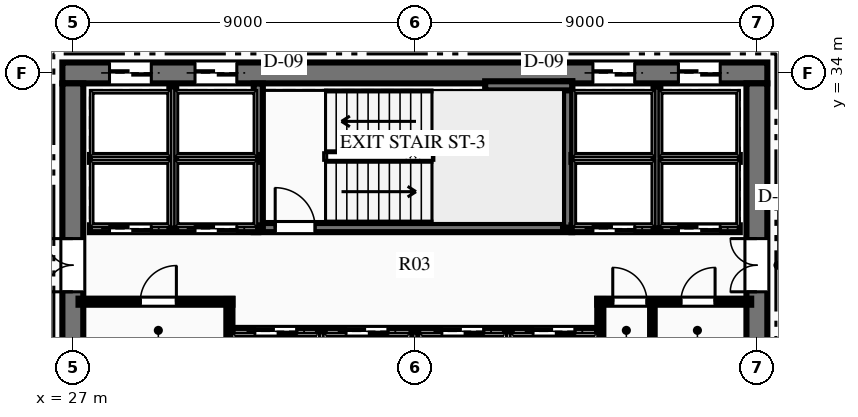
"""IFC4 building model, lengths in metres.
Left out: names, types, materials, properties, quantities, classifications, styles, units other than length and angle.
Written with IfcOpenShell. Run it as: python <this file> out.ifc"""

import sys

from ifc_helpers import new_model, si_unit, direction, frame, frame_2d, origin, place, context, subcontext, project, spatial, rectangle, extrude, element, fill, save


model = new_model("IFC4")
c1 = context("Model", 3, precision=1e-05, world=origin(), true_north=direction((0.0, 1.0)))
c2 = subcontext(c1, "Body", "Model", "MODEL_VIEW")
j1 = project(units=[si_unit("LENGTHUNIT", "METRE"), si_unit("PLANEANGLEUNIT", "RADIAN")], contexts=[c1])
p1 = place(None, origin())
s1 = spatial("IfcSite", under=j1, at=p1, CompositionType="ELEMENT")
p2 = place(p1, origin())
s2 = spatial("IfcBuilding", under=s1, at=p2, CompositionType="ELEMENT")
p3 = place(p2, frame((0.0, 0.0, 105.45)))
s3 = spatial("IfcBuildingStorey", under=s2, at=p3, CompositionType="ELEMENT", Elevation=105.45)
p4 = place(p3, frame((26.725, 34.0, 0.0), z_axis=(0.0, 0.0, 1.0), x_axis=(1.0, 0.0, 0.0)))
e1 = element("IfcWall", 1, at=p4, inside=s3, PredefinedType="SHEAR", context=c2, shape_type="SweptSolid", body=[
    extrude(rectangle(XDim=18.55, YDim=0.55, at=frame_2d((9.275, 0.0))), origin(), (0.0, 0.0, 1.0), 3.75),
])
p5 = place(p4, frame((1.24, 0.0, 0.0)))
e2 = element("IfcOpeningElement", 2, at=p5, cuts=e1, PredefinedType="OPENING", context=c2, shape_type="SweptSolid", body=[
    extrude(rectangle(XDim=1.1, YDim=2.15, at=frame_2d((0.55, 1.075))), frame((0.0, 0.285, 0.0), z_axis=(0.0, -1.0, 0.0), x_axis=(1.0, 0.0, 0.0)), (0.0, 0.0, 1.0), 0.57),
])
p6 = place(p4, frame((3.49, 0.0, 0.0)))
e3 = element("IfcOpeningElement", 3, at=p6, cuts=e1, PredefinedType="OPENING", context=c2, shape_type="SweptSolid", body=[
    extrude(rectangle(XDim=1.1, YDim=2.15, at=frame_2d((0.55, 1.075))), frame((0.0, 0.285, 0.0), z_axis=(0.0, -1.0, 0.0), x_axis=(1.0, 0.0, 0.0)), (0.0, 0.0, 1.0), 0.57),
])
p7 = place(p4, frame((13.96, 0.0, 0.0)))
e4 = element("IfcOpeningElement", 4, at=p7, cuts=e1, PredefinedType="OPENING", context=c2, shape_type="SweptSolid", body=[
    extrude(rectangle(XDim=1.1, YDim=2.15, at=frame_2d((0.55, 1.075))), frame((0.0, 0.285, 0.0), z_axis=(0.0, -1.0, 0.0), x_axis=(1.0, 0.0, 0.0)), (0.0, 0.0, 1.0), 0.57),
])
p8 = place(p4, frame((16.21, 0.0, 0.0)))
e5 = element("IfcOpeningElement", 5, at=p8, cuts=e1, PredefinedType="OPENING", context=c2, shape_type="SweptSolid", body=[
    extrude(rectangle(XDim=1.1, YDim=2.15, at=frame_2d((0.55, 1.075))), frame((0.0, 0.285, 0.0), z_axis=(0.0, -1.0, 0.0), x_axis=(1.0, 0.0, 0.0)), (0.0, 0.0, 1.0), 0.57),
])
p9 = place(p3, frame((27.0, 18.275, 0.0), z_axis=(0.0, 0.0, 1.0), x_axis=(0.0, 1.0, 0.0)))
e6 = element("IfcWall", 6, at=p9, inside=s3, PredefinedType="SHEAR", context=c2, shape_type="SweptSolid", body=[
    extrude(rectangle(XDim=15.45, YDim=0.55, at=frame_2d((7.725, 0.0))), origin(), (0.0, 0.0, 1.0), 3.75),
])
p10 = place(p9, frame((9.965, 0.0, 0.0)))
e7 = element("IfcOpeningElement", 7, at=p10, cuts=e6, PredefinedType="OPENING", context=c2, shape_type="SweptSolid", body=[
    extrude(rectangle(XDim=1.4, YDim=2.2, at=frame_2d((0.7, 1.1))), frame((0.0, 0.285, 0.0), z_axis=(0.0, -1.0, 0.0), x_axis=(1.0, 0.0, 0.0)), (0.0, 0.0, 1.0), 0.57),
])
p11 = place(p3, frame((45.0, 18.275, 0.0), z_axis=(0.0, 0.0, 1.0), x_axis=(0.0, 1.0, 0.0)))
e8 = element("IfcWall", 8, at=p11, inside=s3, PredefinedType="SHEAR", context=c2, shape_type="SweptSolid", body=[
    extrude(rectangle(XDim=15.45, YDim=0.55, at=frame_2d((7.725, 0.0))), origin(), (0.0, 0.0, 1.0), 3.75),
])
p12 = place(p11, frame((9.965, 0.0, 0.0)))
e9 = element("IfcOpeningElement", 9, at=p12, cuts=e8, PredefinedType="OPENING", context=c2, shape_type="SweptSolid", body=[
    extrude(rectangle(XDim=1.4, YDim=2.2, at=frame_2d((0.7, 1.1))), frame((0.0, 0.285, 0.0), z_axis=(0.0, -1.0, 0.0), x_axis=(1.0, 0.0, 0.0)), (0.0, 0.0, 1.0), 0.57),
])
p13 = place(p3, frame((31.76, 29.93, 0.0), z_axis=(0.0, 0.0, 1.0), x_axis=(1.0, 0.0, 0.0)))
e10 = element("IfcWall", 10, at=p13, inside=s3, PredefinedType="SHEAR", context=c2, shape_type="SweptSolid", body=[
    extrude(rectangle(XDim=8.38, YDim=0.24, at=frame_2d((4.19, 0.0))), origin(), (0.0, 0.0, 1.0), 3.75),
])
p14 = place(p13, frame((0.565, 0.0, 0.0)))
e11 = element("IfcOpeningElement", 11, at=p14, cuts=e10, PredefinedType="OPENING", context=c2, shape_type="SweptSolid", body=[
    extrude(rectangle(XDim=1.05, YDim=2.15, at=frame_2d((0.525, 1.075))), frame((0.0, 0.13, 0.0), z_axis=(0.0, -1.0, 0.0), x_axis=(1.0, 0.0, 0.0)), (0.0, 0.0, 1.0), 0.26),
])
p15 = place(p3, frame((31.88, 29.93, 0.0), z_axis=(0.0, 0.0, 1.0), x_axis=(0.0, 1.0, 0.0)))
e12 = element("IfcWall", 12, at=p15, inside=s3, PredefinedType="SHEAR", context=c2, shape_type="SweptSolid", body=[
    extrude(rectangle(XDim=3.79, YDim=0.24, at=frame_2d((1.895, 0.0))), origin(), (0.0, 0.0, 1.0), 3.75),
])
p16 = place(p3, frame((40.02, 29.93, 0.0), z_axis=(0.0, 0.0, 1.0), x_axis=(0.0, 1.0, 0.0)))
e13 = element("IfcWall", 13, at=p16, inside=s3, PredefinedType="SHEAR", context=c2, shape_type="SweptSolid", body=[
    extrude(rectangle(XDim=3.85, YDim=0.24, at=frame_2d((1.925, 0.0))), origin(), (0.0, 0.0, 1.0), 3.75),
])
p17 = place(p3, frame((37.85, 33.66, 0.0), z_axis=(0.0, 0.0, 1.0), x_axis=(1.0, 0.0, 0.0)))
e14 = element("IfcWall", 14, at=p17, inside=s3, PredefinedType="SHEAR", context=c2, shape_type="SweptSolid", body=[
    extrude(rectangle(XDim=2.29, YDim=0.24, at=frame_2d((1.145, 0.0))), origin(), (0.0, 0.0, 1.0), 3.75),
])
p18 = place(p3, frame((27.15, 27.98, 0.0), z_axis=(0.0, 0.0, 1.0), x_axis=(1.0, 0.0, 0.0)))
e15 = element("IfcWall", 15, at=p18, inside=s3, PredefinedType="PARTITIONING", context=c2, shape_type="SweptSolid", body=[
    extrude(rectangle(XDim=4.05, YDim=0.16, at=frame_2d((2.025, 0.0))), origin(), (0.0, 0.0, 1.0), 3.45),
])
p19 = place(p18, frame((1.625, 0.0, 0.0)))
e16 = element("IfcOpeningElement", 16, at=p19, cuts=e15, PredefinedType="OPENING", context=c2, shape_type="SweptSolid", body=[
    extrude(rectangle(XDim=0.95, YDim=2.15, at=frame_2d((0.475, 1.075))), frame((0.0, 0.09, 0.0), z_axis=(0.0, -1.0, 0.0), x_axis=(1.0, 0.0, 0.0)), (0.0, 0.0, 1.0), 0.18),
])
p20 = place(p3, frame((31.12, 26.54, 0.0), z_axis=(0.0, 0.0, 1.0), x_axis=(0.0, 1.0, 0.0)))
e17 = element("IfcWall", 17, at=p20, inside=s3, PredefinedType="PARTITIONING", context=c2, shape_type="SweptSolid", body=[
    extrude(rectangle(XDim=1.51, YDim=0.16, at=frame_2d((0.755, 0.0))), origin(), (0.0, 0.0, 1.0), 3.45),
])
p21 = place(p3, frame((40.8, 27.98, 0.0), z_axis=(0.0, 0.0, 1.0), x_axis=(1.0, 0.0, 0.0)))
e18 = element("IfcWall", 18, at=p21, inside=s3, PredefinedType="PARTITIONING", context=c2, shape_type="SweptSolid", body=[
    extrude(rectangle(XDim=4.05, YDim=0.16, at=frame_2d((2.025, 0.0))), origin(), (0.0, 0.0, 1.0), 3.45),
])
p22 = place(p21, frame((0.407, 0.0, 0.0)))
e19 = element("IfcOpeningElement", 19, at=p22, cuts=e18, PredefinedType="OPENING", context=c2, shape_type="SweptSolid", body=[
    extrude(rectangle(XDim=0.9, YDim=2.15, at=frame_2d((0.45, 1.075))), frame((0.0, 0.09, 0.0), z_axis=(0.0, -1.0, 0.0), x_axis=(1.0, 0.0, 0.0)), (0.0, 0.0, 1.0), 0.18),
])
p23 = place(p21, frame((2.2, 0.0, 0.0)))
e20 = element("IfcOpeningElement", 20, at=p23, cuts=e18, PredefinedType="OPENING", context=c2, shape_type="SweptSolid", body=[
    extrude(rectangle(XDim=0.9, YDim=2.15, at=frame_2d((0.45, 1.075))), frame((0.0, 0.09, 0.0), z_axis=(0.0, -1.0, 0.0), x_axis=(1.0, 0.0, 0.0)), (0.0, 0.0, 1.0), 0.18),
])
p24 = place(p3, frame((40.88, 26.54, 0.0), z_axis=(0.0, 0.0, 1.0), x_axis=(0.0, 1.0, 0.0)))
e21 = element("IfcWall", 21, at=p24, inside=s3, PredefinedType="PARTITIONING", context=c2, shape_type="SweptSolid", body=[
    extrude(rectangle(XDim=1.51, YDim=0.16, at=frame_2d((0.755, 0.0))), origin(), (0.0, 0.0, 1.0), 3.45),
])
p25 = place(p3, frame((42.25, 26.54, 0.0), z_axis=(0.0, 0.0, 1.0), x_axis=(0.0, 1.0, 0.0)))
e22 = element("IfcWall", 22, at=p25, inside=s3, PredefinedType="PARTITIONING", context=c2, shape_type="SweptSolid", body=[
    extrude(rectangle(XDim=1.44, YDim=0.12, at=frame_2d((0.72, 0.0))), origin(), (0.0, 0.0, 1.0), 3.45),
])
p26 = place(p3, frame((27.45, 29.9, 0.0), z_axis=(0.0, 0.0, 1.0), x_axis=(1.0, 0.0, 0.0)))
e23 = element("IfcWall", 23, at=p26, inside=s3, PredefinedType="PARTITIONING", context=c2, shape_type="SweptSolid", body=[
    extrude(rectangle(XDim=4.43, YDim=0.18, at=frame_2d((2.215, 0.0))), origin(), (0.0, 0.0, 1.0), 3.45),
])
p27 = place(p26, frame((0.515, 0.0, 0.0)))
e24 = element("IfcOpeningElement", 24, at=p27, cuts=e23, PredefinedType="OPENING", context=c2, shape_type="SweptSolid", body=[
    extrude(rectangle(XDim=1.1, YDim=2.15, at=frame_2d((0.55, 1.075))), frame((0.0, 0.1, 0.0), z_axis=(0.0, -1.0, 0.0), x_axis=(1.0, 0.0, 0.0)), (0.0, 0.0, 1.0), 0.2),
])
p28 = place(p26, frame((2.765, 0.0, 0.0)))
e25 = element("IfcOpeningElement", 25, at=p28, cuts=e23, PredefinedType="OPENING", context=c2, shape_type="SweptSolid", body=[
    extrude(rectangle(XDim=1.1, YDim=2.15, at=frame_2d((0.55, 1.075))), frame((0.0, 0.1, 0.0), z_axis=(0.0, -1.0, 0.0), x_axis=(1.0, 0.0, 0.0)), (0.0, 0.0, 1.0), 0.2),
])
p29 = place(p3, frame((27.45, 31.75, 0.0), z_axis=(0.0, 0.0, 1.0), x_axis=(1.0, 0.0, 0.0)))
e26 = element("IfcWall", 26, at=p29, inside=s3, PredefinedType="PARTITIONING", context=c2, shape_type="SweptSolid", body=[
    extrude(rectangle(XDim=4.43, YDim=0.18, at=frame_2d((2.215, 0.0))), origin(), (0.0, 0.0, 1.0), 3.45),
])
p30 = place(p3, frame((29.63, 29.9, 0.0), z_axis=(0.0, 0.0, 1.0), x_axis=(0.0, 1.0, 0.0)))
e27 = element("IfcWall", 27, at=p30, inside=s3, PredefinedType="PARTITIONING", context=c2, shape_type="SweptSolid", body=[
    extrude(rectangle(XDim=3.75, YDim=0.18, at=frame_2d((1.875, 0.0))), origin(), (0.0, 0.0, 1.0), 3.45),
])
p31 = place(p3, frame((40.12, 29.9, 0.0), z_axis=(0.0, 0.0, 1.0), x_axis=(1.0, 0.0, 0.0)))
e28 = element("IfcWall", 28, at=p31, inside=s3, PredefinedType="PARTITIONING", context=c2, shape_type="SweptSolid", body=[
    extrude(rectangle(XDim=4.43, YDim=0.18, at=frame_2d((2.215, 0.0))), origin(), (0.0, 0.0, 1.0), 3.45),
])
p32 = place(p31, frame((0.565, 0.0, 0.0)))
e29 = element("IfcOpeningElement", 29, at=p32, cuts=e28, PredefinedType="OPENING", context=c2, shape_type="SweptSolid", body=[
    extrude(rectangle(XDim=1.1, YDim=2.15, at=frame_2d((0.55, 1.075))), frame((0.0, 0.1, 0.0), z_axis=(0.0, -1.0, 0.0), x_axis=(1.0, 0.0, 0.0)), (0.0, 0.0, 1.0), 0.2),
])
p33 = place(p31, frame((2.815, 0.0, 0.0)))
e30 = element("IfcOpeningElement", 30, at=p33, cuts=e28, PredefinedType="OPENING", context=c2, shape_type="SweptSolid", body=[
    extrude(rectangle(XDim=1.1, YDim=2.15, at=frame_2d((0.55, 1.075))), frame((0.0, 0.1, 0.0), z_axis=(0.0, -1.0, 0.0), x_axis=(1.0, 0.0, 0.0)), (0.0, 0.0, 1.0), 0.2),
])
p34 = place(p3, frame((40.12, 31.75, 0.0), z_axis=(0.0, 0.0, 1.0), x_axis=(1.0, 0.0, 0.0)))
e31 = element("IfcWall", 31, at=p34, inside=s3, PredefinedType="PARTITIONING", context=c2, shape_type="SweptSolid", body=[
    extrude(rectangle(XDim=4.43, YDim=0.18, at=frame_2d((2.215, 0.0))), origin(), (0.0, 0.0, 1.0), 3.45),
])
p35 = place(p3, frame((42.37, 29.9, 0.0), z_axis=(0.0, 0.0, 1.0), x_axis=(0.0, 1.0, 0.0)))
e32 = element("IfcWall", 32, at=p35, inside=s3, PredefinedType="PARTITIONING", context=c2, shape_type="SweptSolid", body=[
    extrude(rectangle(XDim=3.75, YDim=0.18, at=frame_2d((1.875, 0.0))), origin(), (0.0, 0.0, 1.0), 3.45),
])
p36 = place(p3, frame((31.2, 27.2, 0.0), z_axis=(0.0, 0.0, 1.0), x_axis=(1.0, 0.0, 0.0)))
e33 = element("IfcWall", 33, at=p36, inside=s3, PredefinedType="PARTITIONING", context=c2, shape_type="SweptSolid", body=[
    extrude(rectangle(XDim=9.6, YDim=0.18, at=frame_2d((4.8, 0.0))), origin(), (0.0, 0.0, 1.0), 3.45),
])
p37 = place(p36, frame((0.59, 0.0, 0.0)))
e34 = element("IfcOpeningElement", 34, at=p37, cuts=e33, PredefinedType="OPENING", context=c2, shape_type="SweptSolid", body=[
    extrude(rectangle(XDim=1.1, YDim=2.15, at=frame_2d((0.55, 1.075))), frame((0.0, 0.1, 0.0), z_axis=(0.0, -1.0, 0.0), x_axis=(1.0, 0.0, 0.0)), (0.0, 0.0, 1.0), 0.2),
])
p38 = place(p36, frame((2.99, 0.0, 0.0)))
e35 = element("IfcOpeningElement", 35, at=p38, cuts=e33, PredefinedType="OPENING", context=c2, shape_type="SweptSolid", body=[
    extrude(rectangle(XDim=1.1, YDim=2.15, at=frame_2d((0.55, 1.075))), frame((0.0, 0.1, 0.0), z_axis=(0.0, -1.0, 0.0), x_axis=(1.0, 0.0, 0.0)), (0.0, 0.0, 1.0), 0.2),
])
p39 = place(p36, frame((5.51, 0.0, 0.0)))
e36 = element("IfcOpeningElement", 36, at=p39, cuts=e33, PredefinedType="OPENING", context=c2, shape_type="SweptSolid", body=[
    extrude(rectangle(XDim=1.1, YDim=2.15, at=frame_2d((0.55, 1.075))), frame((0.0, 0.1, 0.0), z_axis=(0.0, -1.0, 0.0), x_axis=(1.0, 0.0, 0.0)), (0.0, 0.0, 1.0), 0.2),
])
p40 = place(p36, frame((7.91, 0.0, 0.0)))
e37 = element("IfcOpeningElement", 37, at=p40, cuts=e33, PredefinedType="OPENING", context=c2, shape_type="SweptSolid", body=[
    extrude(rectangle(XDim=1.1, YDim=2.15, at=frame_2d((0.55, 1.075))), frame((0.0, 0.1, 0.0), z_axis=(0.0, -1.0, 0.0), x_axis=(1.0, 0.0, 0.0)), (0.0, 0.0, 1.0), 0.2),
])
for number, where, z_axis, x_axis in (
    (38, (33.54, 25.3, 0.0), (0.0, 0.0, 1.0), (0.0, 1.0, 0.0)),
    (39, (36.0, 25.3, 0.0), (0.0, 0.0, 1.0), (0.0, 1.0, 0.0)),
    (40, (38.46, 25.3, 0.0), (0.0, 0.0, 1.0), (0.0, 1.0, 0.0)),
):
    element("IfcWall", number, at=place(p3, frame(where, z_axis=z_axis, x_axis=x_axis)), inside=s3, PredefinedType="PARTITIONING", context=c2, shape_type="SweptSolid", body=[
        extrude(rectangle(XDim=1.9, YDim=0.18, at=frame_2d((0.95, 0.0))), origin(), (0.0, 0.0, 1.0), 3.45),
    ])
p41 = place(p19, origin())
e41 = element("IfcDoor", 41, at=p41, inside=s3, OperationType="SINGLE_SWING_RIGHT", PredefinedType="DOOR", context=c2, shape_type="SweptSolid", body=[
    extrude(rectangle(XDim=0.95, YDim=2.15, at=frame_2d((0.475, 1.075))), frame((0.0, 0.025, 0.0), z_axis=(0.0, -1.0, 0.0), x_axis=(1.0, 0.0, 0.0)), (0.0, 0.0, 1.0), 0.05),
])
fill(e16, e41)
p42 = place(p22, origin())
e42 = element("IfcDoor", 42, at=p42, inside=s3, OperationType="SINGLE_SWING_LEFT", PredefinedType="DOOR", context=c2, shape_type="SweptSolid", body=[
    extrude(rectangle(XDim=0.9, YDim=2.15, at=frame_2d((0.45, 1.075))), frame((0.0, 0.025, 0.0), z_axis=(0.0, -1.0, 0.0), x_axis=(1.0, 0.0, 0.0)), (0.0, 0.0, 1.0), 0.05),
])
fill(e19, e42)
p43 = place(p23, origin())
e43 = element("IfcDoor", 43, at=p43, inside=s3, OperationType="SINGLE_SWING_RIGHT", PredefinedType="DOOR", context=c2, shape_type="SweptSolid", body=[
    extrude(rectangle(XDim=0.9, YDim=2.15, at=frame_2d((0.45, 1.075))), frame((0.0, 0.025, 0.0), z_axis=(0.0, -1.0, 0.0), x_axis=(1.0, 0.0, 0.0)), (0.0, 0.0, 1.0), 0.05),
])
fill(e20, e43)
p44 = place(p14, origin())
e44 = element("IfcDoor", 44, at=p44, inside=s3, OperationType="SINGLE_SWING_LEFT", PredefinedType="DOOR", context=c2, shape_type="SweptSolid", body=[
    extrude(rectangle(XDim=1.05, YDim=2.15, at=frame_2d((0.525, 1.075))), frame((0.0, 0.025, 0.0), z_axis=(0.0, -1.0, 0.0), x_axis=(1.0, 0.0, 0.0)), (0.0, 0.0, 1.0), 0.05),
])
fill(e11, e44)
p45 = place(p10, origin())
e45 = element("IfcDoor", 45, at=p45, inside=s3, OperationType="DOUBLE_DOOR_SINGLE_SWING", PredefinedType="DOOR", context=c2, shape_type="SweptSolid", body=[
    extrude(rectangle(XDim=1.4, YDim=2.2, at=frame_2d((0.7, 1.1))), frame((0.0, 0.025, 0.0), z_axis=(0.0, -1.0, 0.0), x_axis=(1.0, 0.0, 0.0)), (0.0, 0.0, 1.0), 0.05),
])
fill(e7, e45)
p46 = place(p12, origin())
e46 = element("IfcDoor", 46, at=p46, inside=s3, OperationType="DOUBLE_DOOR_SINGLE_SWING", PredefinedType="DOOR", context=c2, shape_type="SweptSolid", body=[
    extrude(rectangle(XDim=1.4, YDim=2.2, at=frame_2d((0.7, 1.1))), frame((0.0, 0.025, 0.0), z_axis=(0.0, -1.0, 0.0), x_axis=(1.0, 0.0, 0.0)), (0.0, 0.0, 1.0), 0.05),
])
fill(e9, e46)
p47 = place(p27, origin())
e47 = element("IfcDoor", 47, at=p47, inside=s3, OperationType="SLIDING_TO_LEFT", PredefinedType="DOOR", context=c2, shape_type="SweptSolid", body=[
    extrude(rectangle(XDim=1.1, YDim=2.15, at=frame_2d((0.55, 1.075))), frame((0.0, 0.025, 0.0), z_axis=(0.0, -1.0, 0.0), x_axis=(1.0, 0.0, 0.0)), (0.0, 0.0, 1.0), 0.05),
])
fill(e24, e47)
p48 = place(p28, origin())
e48 = element("IfcDoor", 48, at=p48, inside=s3, OperationType="SLIDING_TO_LEFT", PredefinedType="DOOR", context=c2, shape_type="SweptSolid", body=[
    extrude(rectangle(XDim=1.1, YDim=2.15, at=frame_2d((0.55, 1.075))), frame((0.0, 0.025, 0.0), z_axis=(0.0, -1.0, 0.0), x_axis=(1.0, 0.0, 0.0)), (0.0, 0.0, 1.0), 0.05),
])
fill(e25, e48)
p49 = place(p5, origin())
e49 = element("IfcDoor", 49, at=p49, inside=s3, OperationType="SLIDING_TO_LEFT", PredefinedType="DOOR", context=c2, shape_type="SweptSolid", body=[
    extrude(rectangle(XDim=1.1, YDim=2.15, at=frame_2d((0.55, 1.075))), frame((0.0, 0.025, 0.0), z_axis=(0.0, -1.0, 0.0), x_axis=(1.0, 0.0, 0.0)), (0.0, 0.0, 1.0), 0.05),
])
fill(e2, e49)
p50 = place(p6, origin())
e50 = element("IfcDoor", 50, at=p50, inside=s3, OperationType="SLIDING_TO_LEFT", PredefinedType="DOOR", context=c2, shape_type="SweptSolid", body=[
    extrude(rectangle(XDim=1.1, YDim=2.15, at=frame_2d((0.55, 1.075))), frame((0.0, 0.025, 0.0), z_axis=(0.0, -1.0, 0.0), x_axis=(1.0, 0.0, 0.0)), (0.0, 0.0, 1.0), 0.05),
])
fill(e3, e50)
p51 = place(p32, origin())
e51 = element("IfcDoor", 51, at=p51, inside=s3, OperationType="SLIDING_TO_LEFT", PredefinedType="DOOR", context=c2, shape_type="SweptSolid", body=[
    extrude(rectangle(XDim=1.1, YDim=2.15, at=frame_2d((0.55, 1.075))), frame((0.0, 0.025, 0.0), z_axis=(0.0, -1.0, 0.0), x_axis=(1.0, 0.0, 0.0)), (0.0, 0.0, 1.0), 0.05),
])
fill(e29, e51)
p52 = place(p33, origin())
e52 = element("IfcDoor", 52, at=p52, inside=s3, OperationType="SLIDING_TO_LEFT", PredefinedType="DOOR", context=c2, shape_type="SweptSolid", body=[
    extrude(rectangle(XDim=1.1, YDim=2.15, at=frame_2d((0.55, 1.075))), frame((0.0, 0.025, 0.0), z_axis=(0.0, -1.0, 0.0), x_axis=(1.0, 0.0, 0.0)), (0.0, 0.0, 1.0), 0.05),
])
fill(e30, e52)
p53 = place(p7, origin())
e53 = element("IfcDoor", 53, at=p53, inside=s3, OperationType="SLIDING_TO_LEFT", PredefinedType="DOOR", context=c2, shape_type="SweptSolid", body=[
    extrude(rectangle(XDim=1.1, YDim=2.15, at=frame_2d((0.55, 1.075))), frame((0.0, 0.025, 0.0), z_axis=(0.0, -1.0, 0.0), x_axis=(1.0, 0.0, 0.0)), (0.0, 0.0, 1.0), 0.05),
])
fill(e4, e53)
p54 = place(p8, origin())
e54 = element("IfcDoor", 54, at=p54, inside=s3, OperationType="SLIDING_TO_LEFT", PredefinedType="DOOR", context=c2, shape_type="SweptSolid", body=[
    extrude(rectangle(XDim=1.1, YDim=2.15, at=frame_2d((0.55, 1.075))), frame((0.0, 0.025, 0.0), z_axis=(0.0, -1.0, 0.0), x_axis=(1.0, 0.0, 0.0)), (0.0, 0.0, 1.0), 0.05),
])
fill(e5, e54)
p55 = place(p37, origin())
e55 = element("IfcDoor", 55, at=p55, inside=s3, OperationType="SLIDING_TO_LEFT", PredefinedType="DOOR", context=c2, shape_type="SweptSolid", body=[
    extrude(rectangle(XDim=1.1, YDim=2.15, at=frame_2d((0.55, 1.075))), frame((0.0, 0.025, 0.0), z_axis=(0.0, -1.0, 0.0), x_axis=(1.0, 0.0, 0.0)), (0.0, 0.0, 1.0), 0.05),
])
fill(e34, e55)
p56 = place(p38, origin())
e56 = element("IfcDoor", 56, at=p56, inside=s3, OperationType="SLIDING_TO_LEFT", PredefinedType="DOOR", context=c2, shape_type="SweptSolid", body=[
    extrude(rectangle(XDim=1.1, YDim=2.15, at=frame_2d((0.55, 1.075))), frame((0.0, 0.025, 0.0), z_axis=(0.0, -1.0, 0.0), x_axis=(1.0, 0.0, 0.0)), (0.0, 0.0, 1.0), 0.05),
])
fill(e35, e56)
p57 = place(p39, origin())
e57 = element("IfcDoor", 57, at=p57, inside=s3, OperationType="SLIDING_TO_LEFT", PredefinedType="DOOR", context=c2, shape_type="SweptSolid", body=[
    extrude(rectangle(XDim=1.1, YDim=2.15, at=frame_2d((0.55, 1.075))), frame((0.0, 0.025, 0.0), z_axis=(0.0, -1.0, 0.0), x_axis=(1.0, 0.0, 0.0)), (0.0, 0.0, 1.0), 0.05),
])
fill(e36, e57)
p58 = place(p40, origin())
e58 = element("IfcDoor", 58, at=p58, inside=s3, OperationType="SLIDING_TO_LEFT", PredefinedType="DOOR", context=c2, shape_type="SweptSolid", body=[
    extrude(rectangle(XDim=1.1, YDim=2.15, at=frame_2d((0.55, 1.075))), frame((0.0, 0.025, 0.0), z_axis=(0.0, -1.0, 0.0), x_axis=(1.0, 0.0, 0.0)), (0.0, 0.0, 1.0), 0.05),
])
fill(e37, e58)
save(model, sys.argv[1])
